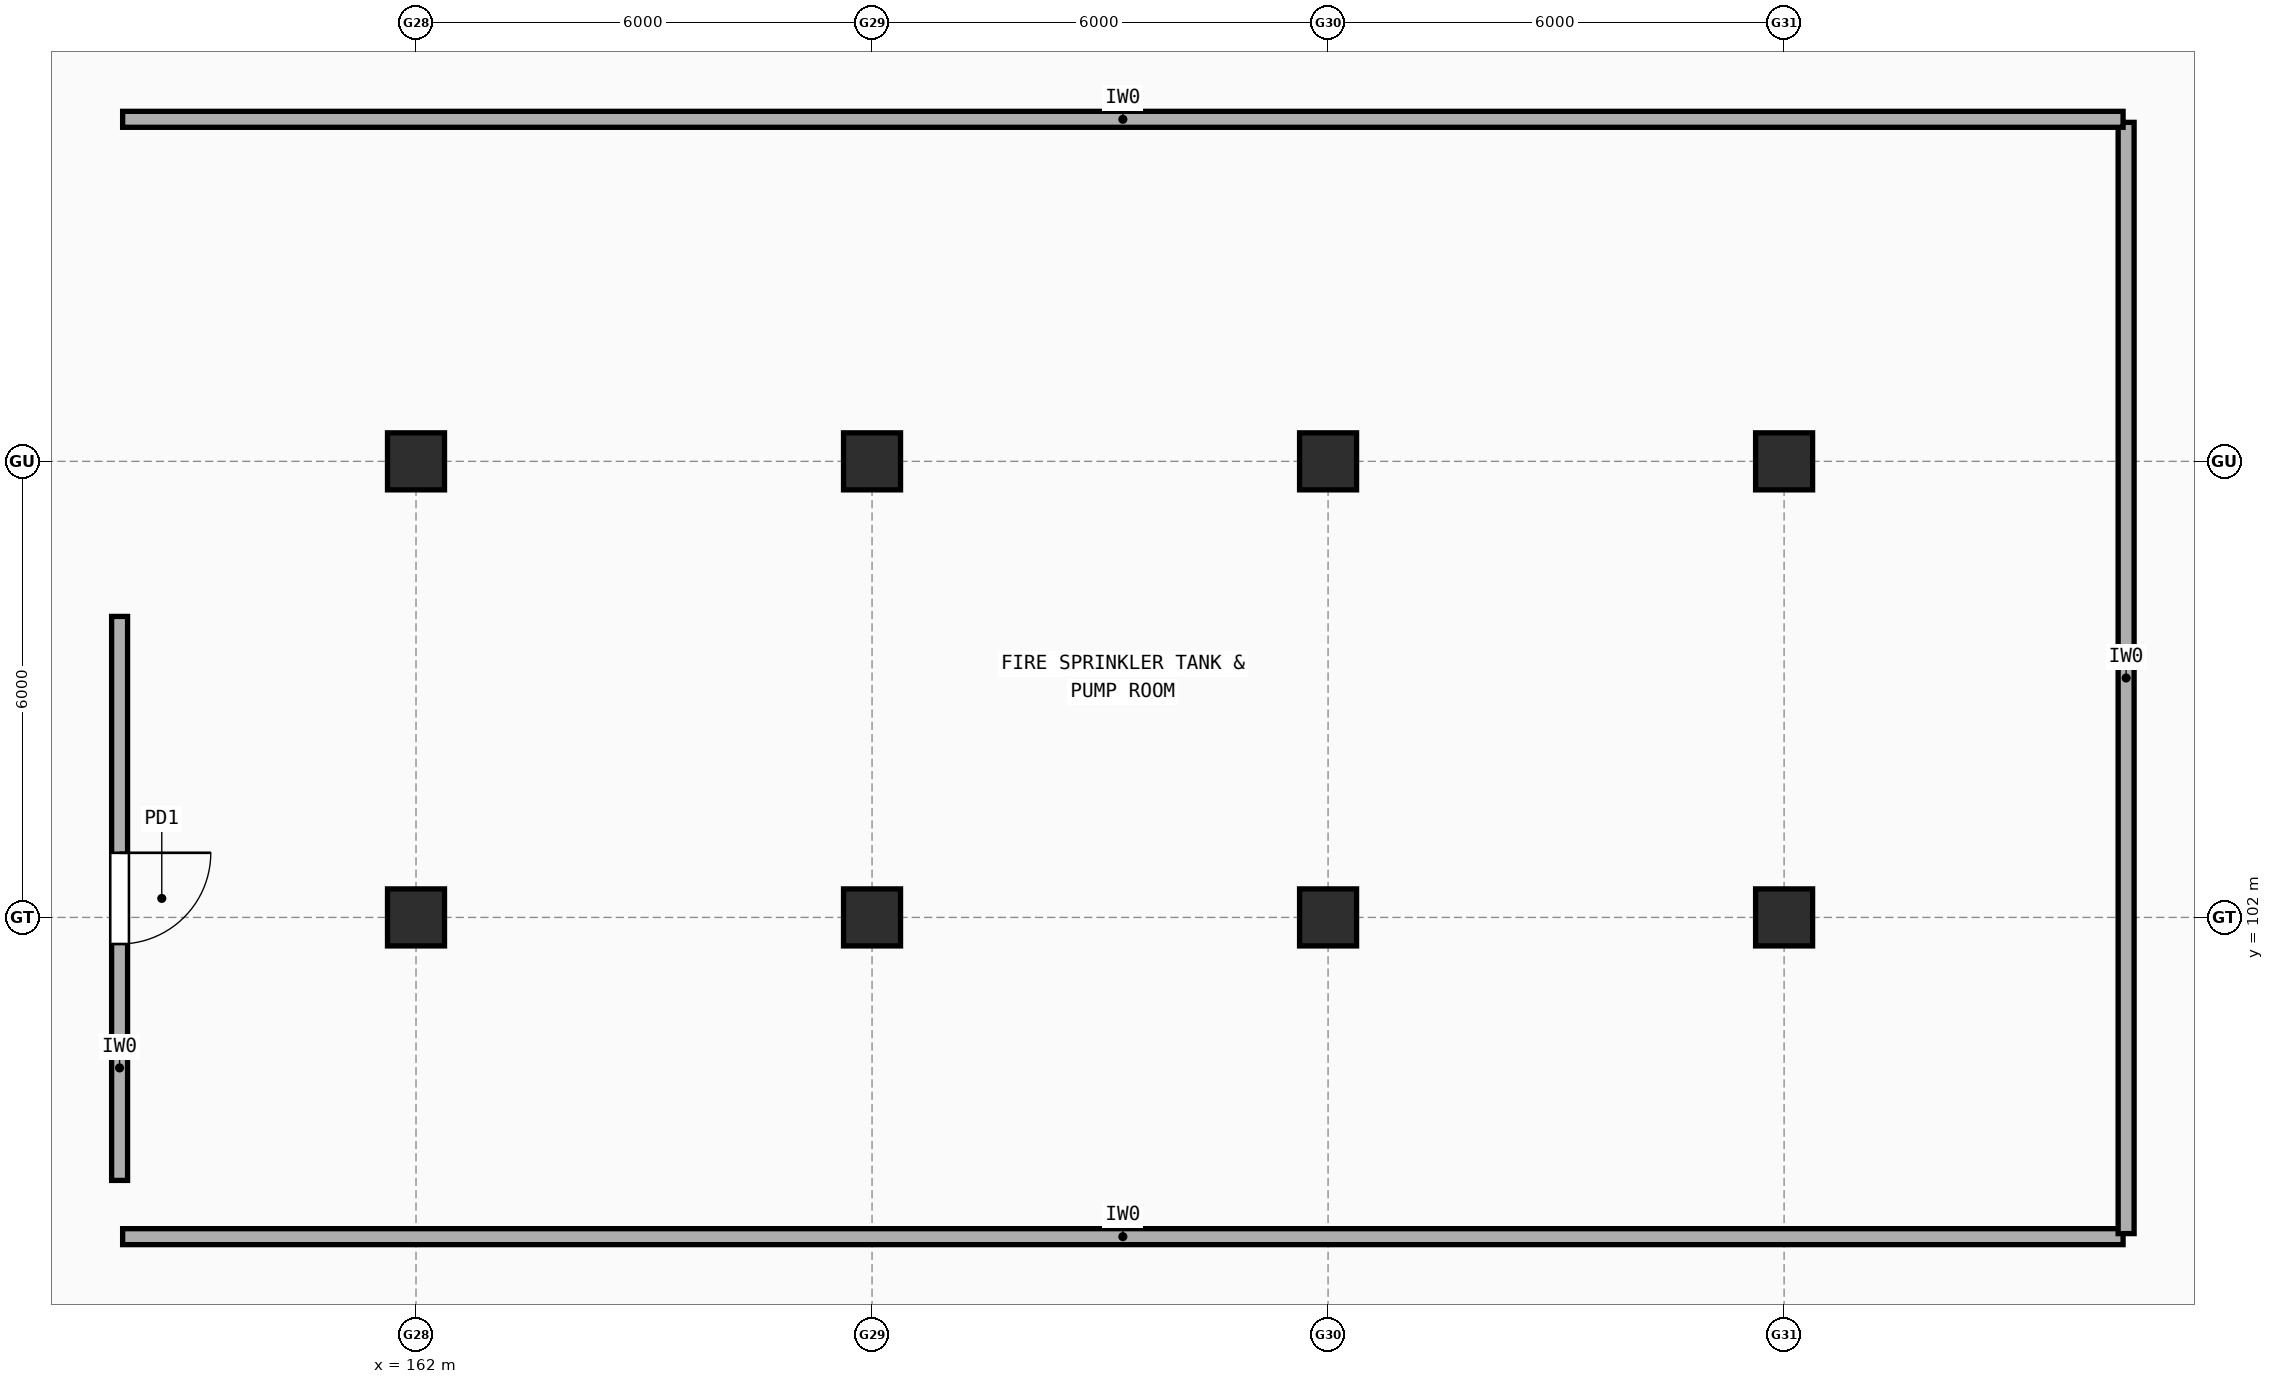
"""IFC4 building model, lengths in metres.
Left out: names, types, materials, properties, quantities, classifications, styles, units other than length and angle.
Written with IfcOpenShell. Run it as: python <this file> out.ifc"""

import sys

from ifc_helpers import new_model, si_unit, direction, frame, frame_2d, origin, origin_2d, place, context, subcontext, project, spatial, rectangle, extrude, element, fill, save


model = new_model("IFC4")
c1 = context("Model", 3, precision=1e-05, world=origin(), true_north=direction((0.0, 1.0)))
c2 = subcontext(c1, "Body", "Model", "MODEL_VIEW")
j1 = project(units=[si_unit("LENGTHUNIT", "METRE"), si_unit("PLANEANGLEUNIT", "RADIAN")], contexts=[c1])
p1 = place(None, origin())
s1 = spatial("IfcSite", under=j1, at=p1, CompositionType="ELEMENT")
p2 = place(p1, origin())
s2 = spatial("IfcBuilding", under=s1, at=p2, CompositionType="ELEMENT")
p3 = place(p2, frame((0.0, 0.0, -4.5)))
s3 = spatial("IfcBuildingStorey", under=s2, at=p3, CompositionType="ELEMENT", Elevation=-4.5)
for number, where, z_axis, x_axis in (
    (1, (162.0, 102.0, 0.0), (0.0, 0.0, 1.0), (1.0, 0.0, 0.0)),
    (2, (162.0, 108.0, 0.0), (0.0, 0.0, 1.0), (1.0, 0.0, 0.0)),
    (3, (168.0, 102.0, 0.0), (0.0, 0.0, 1.0), (1.0, 0.0, 0.0)),
    (4, (168.0, 108.0, 0.0), (0.0, 0.0, 1.0), (1.0, 0.0, 0.0)),
    (5, (174.0, 102.0, 0.0), (0.0, 0.0, 1.0), (1.0, 0.0, 0.0)),
    (6, (174.0, 108.0, 0.0), (0.0, 0.0, 1.0), (1.0, 0.0, 0.0)),
    (7, (180.0, 102.0, 0.0), (0.0, 0.0, 1.0), (1.0, 0.0, 0.0)),
    (8, (180.0, 108.0, 0.0), (0.0, 0.0, 1.0), (1.0, 0.0, 0.0)),
):
    element("IfcColumn", number, at=place(p3, frame(where, z_axis=z_axis, x_axis=x_axis)), inside=s3, PredefinedType="COLUMN", context=c2, shape_type="SweptSolid", body=[
        extrude(rectangle(XDim=0.75, YDim=0.75, at=origin_2d()), origin(), (0.0, 0.0, 1.0), 4.215),
    ])
p4 = place(p3, frame((158.1, 98.54, 0.0), z_axis=(0.0, 0.0, 1.0), x_axis=(0.0, 1.0, 0.0)))
e9 = element("IfcWall", 9, at=p4, inside=s3, PredefinedType="SOLIDWALL", context=c2, shape_type="SweptSolid", body=[
    extrude(rectangle(XDim=7.42, YDim=0.21, at=frame_2d((3.71, 0.0))), origin(), (0.0, 0.0, 1.0), 3.547),
])
p5 = place(p4, frame((3.11, 0.0, 0.0)))
e10 = element("IfcOpeningElement", 10, at=p5, cuts=e9, PredefinedType="OPENING", context=c2, shape_type="SweptSolid", body=[
    extrude(rectangle(XDim=1.2, YDim=2.15, at=frame_2d((0.6, 1.075))), frame((0.0, 0.115, 0.0), z_axis=(0.0, -1.0, 0.0), x_axis=(1.0, 0.0, 0.0)), (0.0, 0.0, 1.0), 0.23),
])
p6 = place(p3, frame((158.14, 97.8, 0.0), z_axis=(0.0, 0.0, 1.0), x_axis=(1.0, 0.0, 0.0)))
e11 = element("IfcWall", 11, at=p6, inside=s3, PredefinedType="SOLIDWALL", context=c2, shape_type="SweptSolid", body=[
    extrude(rectangle(XDim=26.32, YDim=0.21, at=frame_2d((13.16, 0.0))), origin(), (0.0, 0.0, 1.0), 3.497),
])
p7 = place(p3, frame((184.5, 97.84, 0.0), z_axis=(0.0, 0.0, 1.0), x_axis=(0.0, 1.0, 0.0)))
e12 = element("IfcWall", 12, at=p7, inside=s3, PredefinedType="SOLIDWALL", context=c2, shape_type="SweptSolid", body=[
    extrude(rectangle(XDim=14.62, YDim=0.21, at=frame_2d((7.31, 0.0))), origin(), (0.0, 0.0, 1.0), 3.447),
])
p8 = place(p3, frame((184.46, 112.5, 0.0), z_axis=(0.0, 0.0, 1.0), x_axis=(-1.0, 0.0, 0.0)))
e13 = element("IfcWall", 13, at=p8, inside=s3, PredefinedType="SOLIDWALL", context=c2, shape_type="SweptSolid", body=[
    extrude(rectangle(XDim=26.32, YDim=0.21, at=frame_2d((13.16, 0.0))), origin(), (0.0, 0.0, 1.0), 4.215),
])
p9 = place(p5, origin())
e14 = element("IfcDoor", 14, at=p9, inside=s3, OperationType="SINGLE_SWING_RIGHT", PredefinedType="DOOR", context=c2, shape_type="SweptSolid", body=[
    extrude(rectangle(XDim=1.2, YDim=2.15, at=frame_2d((0.6, 1.075))), frame((0.0, 0.025, 0.0), z_axis=(0.0, -1.0, 0.0), x_axis=(1.0, 0.0, 0.0)), (0.0, 0.0, 1.0), 0.05),
])
fill(e10, e14)
save(model, sys.argv[1])
